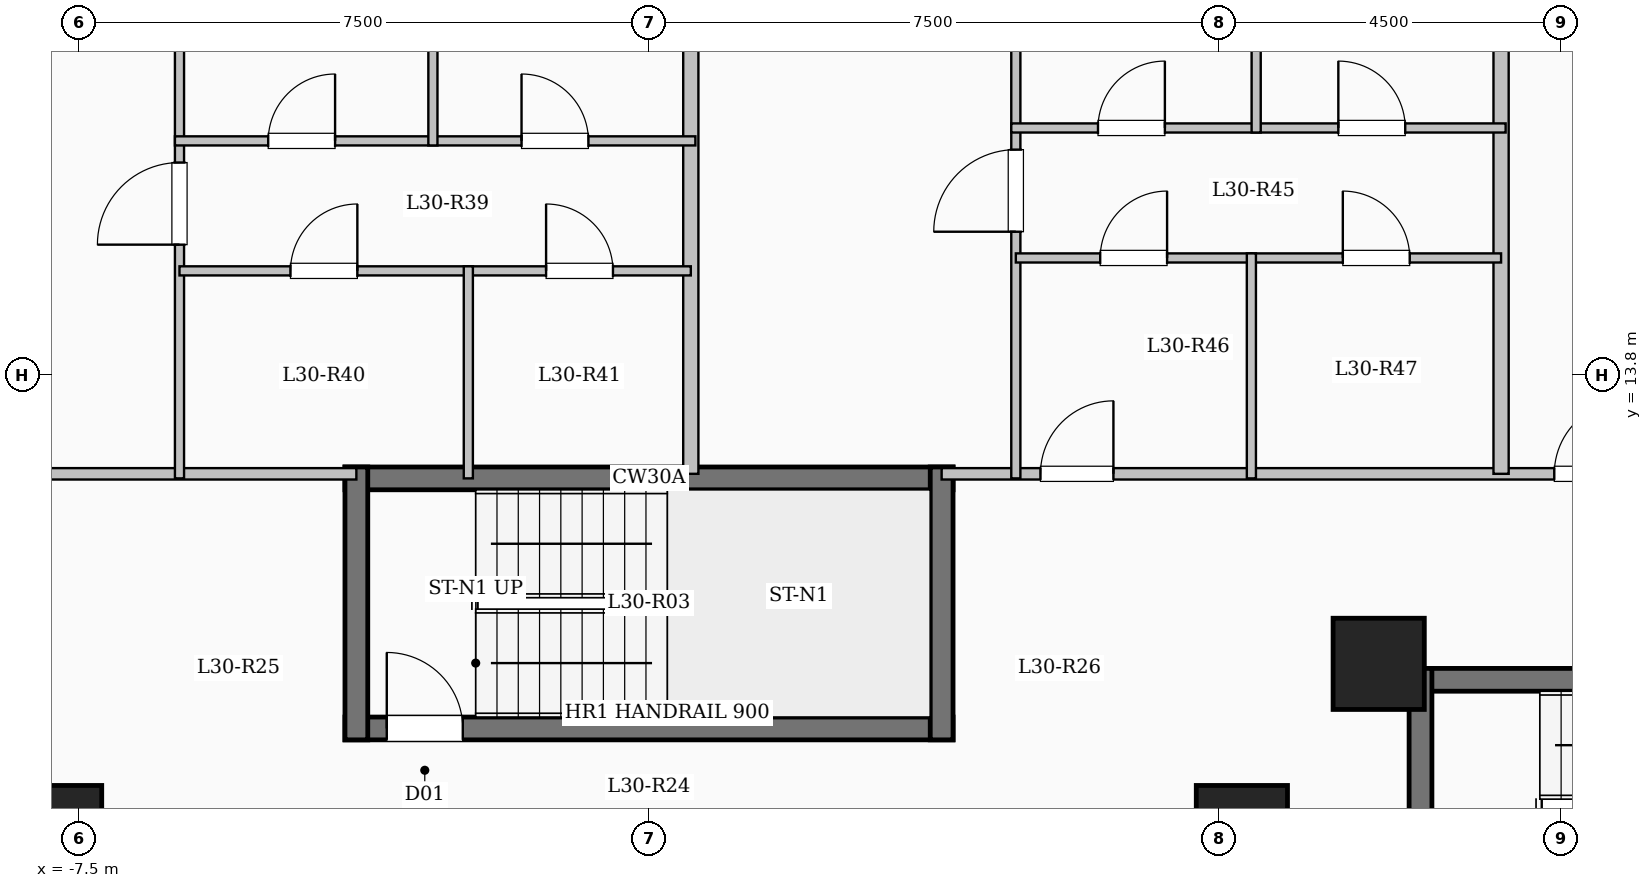
"""IFC4 building model, lengths in metres.
Left out: names, types, materials, properties, quantities, classifications, styles, units other than length and angle.
Written with IfcOpenShell. Run it as: python <this file> out.ifc"""

import sys

from ifc_helpers import new_model, si_unit, direction, frame, frame_2d, origin, origin_2d, place, context, subcontext, project, spatial, rectangle, extrude, element, fill, save


model = new_model("IFC4")
c1 = context("Model", 3, precision=1e-05, world=origin(), true_north=direction((0.0, 1.0)))
c2 = subcontext(c1, "Body", "Model", "MODEL_VIEW")
j1 = project(units=[si_unit("LENGTHUNIT", "METRE"), si_unit("PLANEANGLEUNIT", "RADIAN")], contexts=[c1])
p1 = place(None, origin())
s1 = spatial("IfcSite", under=j1, at=p1, CompositionType="ELEMENT")
p2 = place(p1, origin())
s2 = spatial("IfcBuilding", under=s1, at=p2, CompositionType="ELEMENT")
p3 = place(p2, frame((0.0, 0.0, 111.8)))
s3 = spatial("IfcBuildingStorey", under=s2, at=p3, CompositionType="ELEMENT", Elevation=111.8)
for number, where, z_axis, x_axis in (
    (1, (-7.8, 7.8, 0.0), (0.0, 0.0, 1.0), (1.0, 0.0, 0.0)),
    (2, (7.8, 7.8, 0.0), (0.0, 0.0, 1.0), (1.0, 0.0, 0.0)),
    (3, (9.6, 10.0, 0.0), (0.0, 0.0, 1.0), (1.0, 0.0, 0.0)),
):
    element("IfcColumn", number, at=place(p3, frame(where, z_axis=z_axis, x_axis=x_axis)), inside=s3, PredefinedType="COLUMN", context=c2, shape_type="SweptSolid", body=[
        extrude(rectangle(XDim=1.2, YDim=1.2, at=origin_2d()), origin(), (0.0, 0.0, 1.0), 3.35),
    ])
p4 = place(p3, frame((10.0, 9.79, 0.0), z_axis=(0.0, 0.0, 1.0), x_axis=(1.0, 0.0, 0.0)))
e4 = element("IfcWall", 4, at=p4, inside=s3, PredefinedType="SHEAR", context=c2, shape_type="SweptSolid", body=[
    extrude(rectangle(XDim=8.0, YDim=0.3, at=frame_2d((4.0, 0.0))), origin(), (0.0, 0.0, 1.0), 3.35),
])
p5 = place(p3, frame((10.15, 6.35, 0.0), z_axis=(0.0, 0.0, 1.0), x_axis=(0.0, 1.0, 0.0)))
e5 = element("IfcWall", 5, at=p5, inside=s3, PredefinedType="SHEAR", context=c2, shape_type="SweptSolid", body=[
    extrude(rectangle(XDim=3.59, YDim=0.3, at=frame_2d((1.795, 0.0))), origin(), (0.0, 0.0, 1.0), 3.35),
])
p6 = place(p3, frame((-4.0, 12.44, 0.0), z_axis=(0.0, 0.0, 1.0), x_axis=(1.0, 0.0, 0.0)))
e6 = element("IfcWall", 6, at=p6, inside=s3, PredefinedType="SHEAR", context=c2, shape_type="SweptSolid", body=[
    extrude(rectangle(XDim=8.0, YDim=0.3, at=frame_2d((4.0, 0.0))), origin(), (0.0, 0.0, 1.0), 3.35),
])
p7 = place(p3, frame((-4.0, 9.15, 0.0), z_axis=(0.0, 0.0, 1.0), x_axis=(1.0, 0.0, 0.0)))
e7 = element("IfcWall", 7, at=p7, inside=s3, PredefinedType="SHEAR", context=c2, shape_type="SweptSolid", body=[
    extrude(rectangle(XDim=8.0, YDim=0.3, at=frame_2d((4.0, 0.0))), origin(), (0.0, 0.0, 1.0), 3.35),
])
p8 = place(p7, frame((0.55, 0.0, 0.0)))
e8 = element("IfcOpeningElement", 8, at=p8, cuts=e7, PredefinedType="OPENING", context=c2, shape_type="SweptSolid", body=[
    extrude(rectangle(XDim=1.0, YDim=2.15, at=frame_2d((0.5, 1.075))), frame((0.0, 0.16, 0.0), z_axis=(0.0, -1.0, 0.0), x_axis=(1.0, 0.0, 0.0)), (0.0, 0.0, 1.0), 0.32),
])
for number, where, z_axis, x_axis in (
    (9, (-3.85, 9.0, 0.0), (0.0, 0.0, 1.0), (0.0, 1.0, 0.0)),
    (10, (3.85, 9.0, 0.0), (0.0, 0.0, 1.0), (0.0, 1.0, 0.0)),
):
    element("IfcWall", number, at=place(p3, frame(where, z_axis=z_axis, x_axis=x_axis)), inside=s3, PredefinedType="SHEAR", context=c2, shape_type="SweptSolid", body=[
        extrude(rectangle(XDim=3.59, YDim=0.3, at=frame_2d((1.795, 0.0))), origin(), (0.0, 0.0, 1.0), 3.35),
    ])
p9 = place(p3, frame((-21.05, 12.5, 0.0), z_axis=(0.0, 0.0, 1.0), x_axis=(1.0, 0.0, 0.0)))
e11 = element("IfcWall", 11, at=p9, inside=s3, PredefinedType="PARTITIONING", context=c2, shape_type="SweptSolid", body=[
    extrude(rectangle(XDim=17.2, YDim=0.15, at=frame_2d((8.6, 0.0))), origin(), (0.0, 0.0, 1.0), 3.1),
])
p10 = place(p9, frame((0.7, 0.0, 0.0)))
e12 = element("IfcOpeningElement", 12, at=p10, cuts=e11, PredefinedType="OPENING", context=c2, shape_type="SweptSolid", body=[
    extrude(rectangle(XDim=0.96, YDim=2.15, at=frame_2d((0.48, 1.075))), frame((0.0, 0.085, 0.0), z_axis=(0.0, -1.0, 0.0), x_axis=(1.0, 0.0, 0.0)), (0.0, 0.0, 1.0), 0.17),
])
p11 = place(p9, frame((11.068, 0.0, 0.0)))
e13 = element("IfcOpeningElement", 13, at=p11, cuts=e11, PredefinedType="OPENING", context=c2, shape_type="SweptSolid", body=[
    extrude(rectangle(XDim=0.96, YDim=2.15, at=frame_2d((0.48, 1.075))), frame((0.0, 0.085, 0.0), z_axis=(0.0, -1.0, 0.0), x_axis=(1.0, 0.0, 0.0)), (0.0, 0.0, 1.0), 0.17),
])
p12 = place(p3, frame((3.85, 12.5, 0.0), z_axis=(0.0, 0.0, 1.0), x_axis=(1.0, 0.0, 0.0)))
e14 = element("IfcWall", 14, at=p12, inside=s3, PredefinedType="PARTITIONING", context=c2, shape_type="SweptSolid", body=[
    extrude(rectangle(XDim=17.2, YDim=0.15, at=frame_2d((8.6, 0.0))), origin(), (0.0, 0.0, 1.0), 3.1),
])
p13 = place(p12, frame((1.3, 0.0, 0.0)))
e15 = element("IfcOpeningElement", 15, at=p13, cuts=e14, PredefinedType="OPENING", context=c2, shape_type="SweptSolid", body=[
    extrude(rectangle(XDim=0.96, YDim=2.15, at=frame_2d((0.48, 1.075))), frame((0.0, 0.085, 0.0), z_axis=(0.0, -1.0, 0.0), x_axis=(1.0, 0.0, 0.0)), (0.0, 0.0, 1.0), 0.17),
])
p14 = place(p12, frame((8.06, 0.0, 0.0)))
e16 = element("IfcOpeningElement", 16, at=p14, cuts=e14, PredefinedType="OPENING", context=c2, shape_type="SweptSolid", body=[
    extrude(rectangle(XDim=0.96, YDim=2.15, at=frame_2d((0.48, 1.075))), frame((0.0, 0.085, 0.0), z_axis=(0.0, -1.0, 0.0), x_axis=(1.0, 0.0, 0.0)), (0.0, 0.0, 1.0), 0.17),
])
p15 = place(p3, frame((0.55, 12.5, 0.0), z_axis=(0.0, 0.0, 1.0), x_axis=(0.0, 1.0, 0.0)))
e17 = element("IfcWall", 17, at=p15, inside=s3, PredefinedType="SOLIDWALL", context=c2, shape_type="SweptSolid", body=[
    extrude(rectangle(XDim=11.08, YDim=0.2, at=frame_2d((5.54, 0.0))), origin(), (0.0, 0.0, 1.0), 3.1),
])
p16 = place(p3, frame((-6.177, 12.44, 0.0), z_axis=(0.0, 0.0, 1.0), x_axis=(0.0, 1.0, 0.0)))
e18 = element("IfcWall", 18, at=p16, inside=s3, PredefinedType="PARTITIONING", context=c2, shape_type="SweptSolid", body=[
    extrude(rectangle(XDim=10.85, YDim=0.12, at=frame_2d((5.425, 0.0))), origin(), (0.0, 0.0, 1.0), 3.1),
])
p17 = place(p16, frame((3.075, 0.0, 0.0)))
e19 = element("IfcOpeningElement", 19, at=p17, cuts=e18, PredefinedType="OPENING", context=c2, shape_type="SweptSolid", body=[
    extrude(rectangle(XDim=1.08, YDim=2.15, at=frame_2d((0.54, 1.075))), frame((0.0, 0.07, 0.0), z_axis=(0.0, -1.0, 0.0), x_axis=(1.0, 0.0, 0.0)), (0.0, 0.0, 1.0), 0.14),
])
p18 = place(p3, frame((-6.177, 15.17, 0.0), z_axis=(0.0, 0.0, 1.0), x_axis=(1.0, 0.0, 0.0)))
e20 = element("IfcWall", 20, at=p18, inside=s3, PredefinedType="PARTITIONING", context=c2, shape_type="SweptSolid", body=[
    extrude(rectangle(XDim=3.8, YDim=0.12, at=frame_2d((1.9, 0.0))), origin(), (0.0, 0.0, 1.0), 3.1),
])
p19 = place(p18, frame((1.46, 0.0, 0.0)))
e21 = element("IfcOpeningElement", 21, at=p19, cuts=e20, PredefinedType="OPENING", context=c2, shape_type="SweptSolid", body=[
    extrude(rectangle(XDim=0.88, YDim=2.1, at=frame_2d((0.44, 1.05))), frame((0.0, 0.07, 0.0), z_axis=(0.0, -1.0, 0.0), x_axis=(1.0, 0.0, 0.0)), (0.0, 0.0, 1.0), 0.14),
])
p20 = place(p3, frame((-2.377, 15.17, 0.0), z_axis=(0.0, 0.0, 1.0), x_axis=(1.0, 0.0, 0.0)))
e22 = element("IfcWall", 22, at=p20, inside=s3, PredefinedType="PARTITIONING", context=c2, shape_type="SweptSolid", body=[
    extrude(rectangle(XDim=2.927, YDim=0.12, at=frame_2d((1.463, 0.0))), origin(), (0.0, 0.0, 1.0), 3.1),
])
p21 = place(p20, frame((1.023, 0.0, 0.0)))
e23 = element("IfcOpeningElement", 23, at=p21, cuts=e22, PredefinedType="OPENING", context=c2, shape_type="SweptSolid", body=[
    extrude(rectangle(XDim=0.88, YDim=2.1, at=frame_2d((0.44, 1.05))), frame((0.0, 0.07, 0.0), z_axis=(0.0, -1.0, 0.0), x_axis=(1.0, 0.0, 0.0)), (0.0, 0.0, 1.0), 0.14),
])
p22 = place(p3, frame((-6.237, 16.88, 0.0), z_axis=(0.0, 0.0, 1.0), x_axis=(1.0, 0.0, 0.0)))
e24 = element("IfcWall", 24, at=p22, inside=s3, PredefinedType="PARTITIONING", context=c2, shape_type="SweptSolid", body=[
    extrude(rectangle(XDim=6.847, YDim=0.12, at=frame_2d((3.424, 0.0))), origin(), (0.0, 0.0, 1.0), 3.1),
])
p23 = place(p22, frame((1.227, 0.0, 0.0)))
e25 = element("IfcOpeningElement", 25, at=p23, cuts=e24, PredefinedType="OPENING", context=c2, shape_type="SweptSolid", body=[
    extrude(rectangle(XDim=0.88, YDim=2.1, at=frame_2d((0.44, 1.05))), frame((0.0, 0.07, 0.0), z_axis=(0.0, -1.0, 0.0), x_axis=(1.0, 0.0, 0.0)), (0.0, 0.0, 1.0), 0.14),
])
p24 = place(p22, frame((4.56, 0.0, 0.0)))
e26 = element("IfcOpeningElement", 26, at=p24, cuts=e24, PredefinedType="OPENING", context=c2, shape_type="SweptSolid", body=[
    extrude(rectangle(XDim=0.88, YDim=2.1, at=frame_2d((0.44, 1.05))), frame((0.0, 0.07, 0.0), z_axis=(0.0, -1.0, 0.0), x_axis=(1.0, 0.0, 0.0)), (0.0, 0.0, 1.0), 0.14),
])
p25 = place(p3, frame((-2.377, 12.44, 0.0), z_axis=(0.0, 0.0, 1.0), x_axis=(0.0, 1.0, 0.0)))
e27 = element("IfcWall", 27, at=p25, inside=s3, PredefinedType="PARTITIONING", context=c2, shape_type="SweptSolid", body=[
    extrude(rectangle(XDim=2.79, YDim=0.12, at=frame_2d((1.395, 0.0))), origin(), (0.0, 0.0, 1.0), 3.1),
])
p26 = place(p3, frame((-2.843, 16.82, 0.0), z_axis=(0.0, 0.0, 1.0), x_axis=(0.0, 1.0, 0.0)))
e28 = element("IfcWall", 28, at=p26, inside=s3, PredefinedType="PARTITIONING", context=c2, shape_type="SweptSolid", body=[
    extrude(rectangle(XDim=6.76, YDim=0.12, at=frame_2d((3.38, 0.0))), origin(), (0.0, 0.0, 1.0), 3.1),
])
p27 = place(p3, frame((11.21, 12.5, 0.0), z_axis=(0.0, 0.0, 1.0), x_axis=(0.0, 1.0, 0.0)))
e29 = element("IfcWall", 29, at=p27, inside=s3, PredefinedType="SOLIDWALL", context=c2, shape_type="SweptSolid", body=[
    extrude(rectangle(XDim=9.6, YDim=0.2, at=frame_2d((4.8, 0.0))), origin(), (0.0, 0.0, 1.0), 3.1),
])
p28 = place(p3, frame((4.826, 12.44, 0.0), z_axis=(0.0, 0.0, 1.0), x_axis=(0.0, 1.0, 0.0)))
e30 = element("IfcWall", 30, at=p28, inside=s3, PredefinedType="PARTITIONING", context=c2, shape_type="SweptSolid", body=[
    extrude(rectangle(XDim=11.14, YDim=0.12, at=frame_2d((5.57, 0.0))), origin(), (0.0, 0.0, 1.0), 3.1),
])
p29 = place(p28, frame((3.245, 0.0, 0.0)))
e31 = element("IfcOpeningElement", 31, at=p29, cuts=e30, PredefinedType="OPENING", context=c2, shape_type="SweptSolid", body=[
    extrude(rectangle(XDim=1.08, YDim=2.15, at=frame_2d((0.54, 1.075))), frame((0.0, 0.07, 0.0), z_axis=(0.0, -1.0, 0.0), x_axis=(1.0, 0.0, 0.0)), (0.0, 0.0, 1.0), 0.14),
])
p30 = place(p3, frame((4.826, 15.34, 0.0), z_axis=(0.0, 0.0, 1.0), x_axis=(1.0, 0.0, 0.0)))
e32 = element("IfcWall", 32, at=p30, inside=s3, PredefinedType="PARTITIONING", context=c2, shape_type="SweptSolid", body=[
    extrude(rectangle(XDim=3.099, YDim=0.12, at=frame_2d((1.55, 0.0))), origin(), (0.0, 0.0, 1.0), 3.1),
])
p31 = place(p30, frame((1.11, 0.0, 0.0)))
e33 = element("IfcOpeningElement", 33, at=p31, cuts=e32, PredefinedType="OPENING", context=c2, shape_type="SweptSolid", body=[
    extrude(rectangle(XDim=0.88, YDim=2.1, at=frame_2d((0.44, 1.05))), frame((0.0, 0.07, 0.0), z_axis=(0.0, -1.0, 0.0), x_axis=(1.0, 0.0, 0.0)), (0.0, 0.0, 1.0), 0.14),
])
p32 = place(p3, frame((7.925, 15.34, 0.0), z_axis=(0.0, 0.0, 1.0), x_axis=(1.0, 0.0, 0.0)))
e34 = element("IfcWall", 34, at=p32, inside=s3, PredefinedType="PARTITIONING", context=c2, shape_type="SweptSolid", body=[
    extrude(rectangle(XDim=3.285, YDim=0.12, at=frame_2d((1.643, 0.0))), origin(), (0.0, 0.0, 1.0), 3.1),
])
p33 = place(p32, frame((1.203, 0.0, 0.0)))
e35 = element("IfcOpeningElement", 35, at=p33, cuts=e34, PredefinedType="OPENING", context=c2, shape_type="SweptSolid", body=[
    extrude(rectangle(XDim=0.88, YDim=2.1, at=frame_2d((0.44, 1.05))), frame((0.0, 0.07, 0.0), z_axis=(0.0, -1.0, 0.0), x_axis=(1.0, 0.0, 0.0)), (0.0, 0.0, 1.0), 0.14),
])
p34 = place(p3, frame((4.766, 17.05, 0.0), z_axis=(0.0, 0.0, 1.0), x_axis=(1.0, 0.0, 0.0)))
e36 = element("IfcWall", 36, at=p34, inside=s3, PredefinedType="PARTITIONING", context=c2, shape_type="SweptSolid", body=[
    extrude(rectangle(XDim=6.504, YDim=0.12, at=frame_2d((3.252, 0.0))), origin(), (0.0, 0.0, 1.0), 3.1),
])
p35 = place(p34, frame((1.141, 0.0, 0.0)))
e37 = element("IfcOpeningElement", 37, at=p35, cuts=e36, PredefinedType="OPENING", context=c2, shape_type="SweptSolid", body=[
    extrude(rectangle(XDim=0.88, YDim=2.1, at=frame_2d((0.44, 1.05))), frame((0.0, 0.07, 0.0), z_axis=(0.0, -1.0, 0.0), x_axis=(1.0, 0.0, 0.0)), (0.0, 0.0, 1.0), 0.14),
])
p36 = place(p34, frame((4.303, 0.0, 0.0)))
e38 = element("IfcOpeningElement", 38, at=p36, cuts=e36, PredefinedType="OPENING", context=c2, shape_type="SweptSolid", body=[
    extrude(rectangle(XDim=0.88, YDim=2.1, at=frame_2d((0.44, 1.05))), frame((0.0, 0.07, 0.0), z_axis=(0.0, -1.0, 0.0), x_axis=(1.0, 0.0, 0.0)), (0.0, 0.0, 1.0), 0.14),
])
p37 = place(p3, frame((7.925, 12.44, 0.0), z_axis=(0.0, 0.0, 1.0), x_axis=(0.0, 1.0, 0.0)))
e39 = element("IfcWall", 39, at=p37, inside=s3, PredefinedType="PARTITIONING", context=c2, shape_type="SweptSolid", body=[
    extrude(rectangle(XDim=2.96, YDim=0.12, at=frame_2d((1.48, 0.0))), origin(), (0.0, 0.0, 1.0), 2.435),
])
p38 = place(p3, frame((7.988, 16.99, 0.0), z_axis=(0.0, 0.0, 1.0), x_axis=(0.0, 1.0, 0.0)))
e40 = element("IfcWall", 40, at=p38, inside=s3, PredefinedType="PARTITIONING", context=c2, shape_type="SweptSolid", body=[
    extrude(rectangle(XDim=5.853, YDim=0.12, at=frame_2d((2.927, 0.0))), origin(), (0.0, 0.0, 1.0), 2.435),
])
p39 = place(p8, origin())
e41 = element("IfcDoor", 41, at=p39, inside=s3, OperationType="SINGLE_SWING_LEFT", PredefinedType="DOOR", context=c2, shape_type="SweptSolid", body=[
    extrude(rectangle(XDim=1.0, YDim=2.15, at=frame_2d((0.5, 1.075))), frame((0.0, 0.025, 0.0), z_axis=(0.0, -1.0, 0.0), x_axis=(1.0, 0.0, 0.0)), (0.0, 0.0, 1.0), 0.05),
])
fill(e8, e41)
p40 = place(p17, origin())
e42 = element("IfcDoor", 42, at=p40, inside=s3, OperationType="SINGLE_SWING_LEFT", PredefinedType="DOOR", context=c2, shape_type="SweptSolid", body=[
    extrude(rectangle(XDim=1.08, YDim=2.15, at=frame_2d((0.54, 1.075))), frame((0.0, 0.025, 0.0), z_axis=(0.0, -1.0, 0.0), x_axis=(1.0, 0.0, 0.0)), (0.0, 0.0, 1.0), 0.05),
])
fill(e19, e42)
p41 = place(p19, origin())
e43 = element("IfcDoor", 43, at=p41, inside=s3, OperationType="SINGLE_SWING_RIGHT", PredefinedType="DOOR", context=c2, shape_type="SweptSolid", body=[
    extrude(rectangle(XDim=0.88, YDim=2.1, at=frame_2d((0.44, 1.05))), frame((0.0, 0.025, 0.0), z_axis=(0.0, -1.0, 0.0), x_axis=(1.0, 0.0, 0.0)), (0.0, 0.0, 1.0), 0.05),
])
fill(e21, e43)
p42 = place(p21, origin())
e44 = element("IfcDoor", 44, at=p42, inside=s3, OperationType="SINGLE_SWING_LEFT", PredefinedType="DOOR", context=c2, shape_type="SweptSolid", body=[
    extrude(rectangle(XDim=0.88, YDim=2.1, at=frame_2d((0.44, 1.05))), frame((0.0, 0.025, 0.0), z_axis=(0.0, -1.0, 0.0), x_axis=(1.0, 0.0, 0.0)), (0.0, 0.0, 1.0), 0.05),
])
fill(e23, e44)
p43 = place(p23, origin())
e45 = element("IfcDoor", 45, at=p43, inside=s3, OperationType="SINGLE_SWING_RIGHT", PredefinedType="DOOR", context=c2, shape_type="SweptSolid", body=[
    extrude(rectangle(XDim=0.88, YDim=2.1, at=frame_2d((0.44, 1.05))), frame((0.0, 0.025, 0.0), z_axis=(0.0, -1.0, 0.0), x_axis=(1.0, 0.0, 0.0)), (0.0, 0.0, 1.0), 0.05),
])
fill(e25, e45)
p44 = place(p24, origin())
e46 = element("IfcDoor", 46, at=p44, inside=s3, OperationType="SINGLE_SWING_LEFT", PredefinedType="DOOR", context=c2, shape_type="SweptSolid", body=[
    extrude(rectangle(XDim=0.88, YDim=2.1, at=frame_2d((0.44, 1.05))), frame((0.0, 0.025, 0.0), z_axis=(0.0, -1.0, 0.0), x_axis=(1.0, 0.0, 0.0)), (0.0, 0.0, 1.0), 0.05),
])
fill(e26, e46)
p45 = place(p13, origin())
e47 = element("IfcDoor", 47, at=p45, inside=s3, OperationType="SINGLE_SWING_RIGHT", PredefinedType="DOOR", context=c2, shape_type="SweptSolid", body=[
    extrude(rectangle(XDim=0.96, YDim=2.15, at=frame_2d((0.48, 1.075))), frame((0.0, 0.025, 0.0), z_axis=(0.0, -1.0, 0.0), x_axis=(1.0, 0.0, 0.0)), (0.0, 0.0, 1.0), 0.05),
])
fill(e15, e47)
p46 = place(p29, origin())
e48 = element("IfcDoor", 48, at=p46, inside=s3, OperationType="SINGLE_SWING_LEFT", PredefinedType="DOOR", context=c2, shape_type="SweptSolid", body=[
    extrude(rectangle(XDim=1.08, YDim=2.15, at=frame_2d((0.54, 1.075))), frame((0.0, 0.025, 0.0), z_axis=(0.0, -1.0, 0.0), x_axis=(1.0, 0.0, 0.0)), (0.0, 0.0, 1.0), 0.05),
])
fill(e31, e48)
p47 = place(p31, origin())
e49 = element("IfcDoor", 49, at=p47, inside=s3, OperationType="SINGLE_SWING_RIGHT", PredefinedType="DOOR", context=c2, shape_type="SweptSolid", body=[
    extrude(rectangle(XDim=0.88, YDim=2.1, at=frame_2d((0.44, 1.05))), frame((0.0, 0.025, 0.0), z_axis=(0.0, -1.0, 0.0), x_axis=(1.0, 0.0, 0.0)), (0.0, 0.0, 1.0), 0.05),
])
fill(e33, e49)
p48 = place(p33, origin())
e50 = element("IfcDoor", 50, at=p48, inside=s3, OperationType="SINGLE_SWING_LEFT", PredefinedType="DOOR", context=c2, shape_type="SweptSolid", body=[
    extrude(rectangle(XDim=0.88, YDim=2.1, at=frame_2d((0.44, 1.05))), frame((0.0, 0.025, 0.0), z_axis=(0.0, -1.0, 0.0), x_axis=(1.0, 0.0, 0.0)), (0.0, 0.0, 1.0), 0.05),
])
fill(e35, e50)
p49 = place(p35, origin())
e51 = element("IfcDoor", 51, at=p49, inside=s3, OperationType="SINGLE_SWING_RIGHT", PredefinedType="DOOR", context=c2, shape_type="SweptSolid", body=[
    extrude(rectangle(XDim=0.88, YDim=2.1, at=frame_2d((0.44, 1.05))), frame((0.0, 0.025, 0.0), z_axis=(0.0, -1.0, 0.0), x_axis=(1.0, 0.0, 0.0)), (0.0, 0.0, 1.0), 0.05),
])
fill(e37, e51)
p50 = place(p36, origin())
e52 = element("IfcDoor", 52, at=p50, inside=s3, OperationType="SINGLE_SWING_LEFT", PredefinedType="DOOR", context=c2, shape_type="SweptSolid", body=[
    extrude(rectangle(XDim=0.88, YDim=2.1, at=frame_2d((0.44, 1.05))), frame((0.0, 0.025, 0.0), z_axis=(0.0, -1.0, 0.0), x_axis=(1.0, 0.0, 0.0)), (0.0, 0.0, 1.0), 0.05),
])
fill(e38, e52)
p51 = place(p14, origin())
e53 = element("IfcDoor", 53, at=p51, inside=s3, OperationType="SINGLE_SWING_RIGHT", PredefinedType="DOOR", context=c2, shape_type="SweptSolid", body=[
    extrude(rectangle(XDim=0.96, YDim=2.15, at=frame_2d((0.48, 1.075))), frame((0.0, 0.025, 0.0), z_axis=(0.0, -1.0, 0.0), x_axis=(1.0, 0.0, 0.0)), (0.0, 0.0, 1.0), 0.05),
])
fill(e16, e53)
save(model, sys.argv[1])
